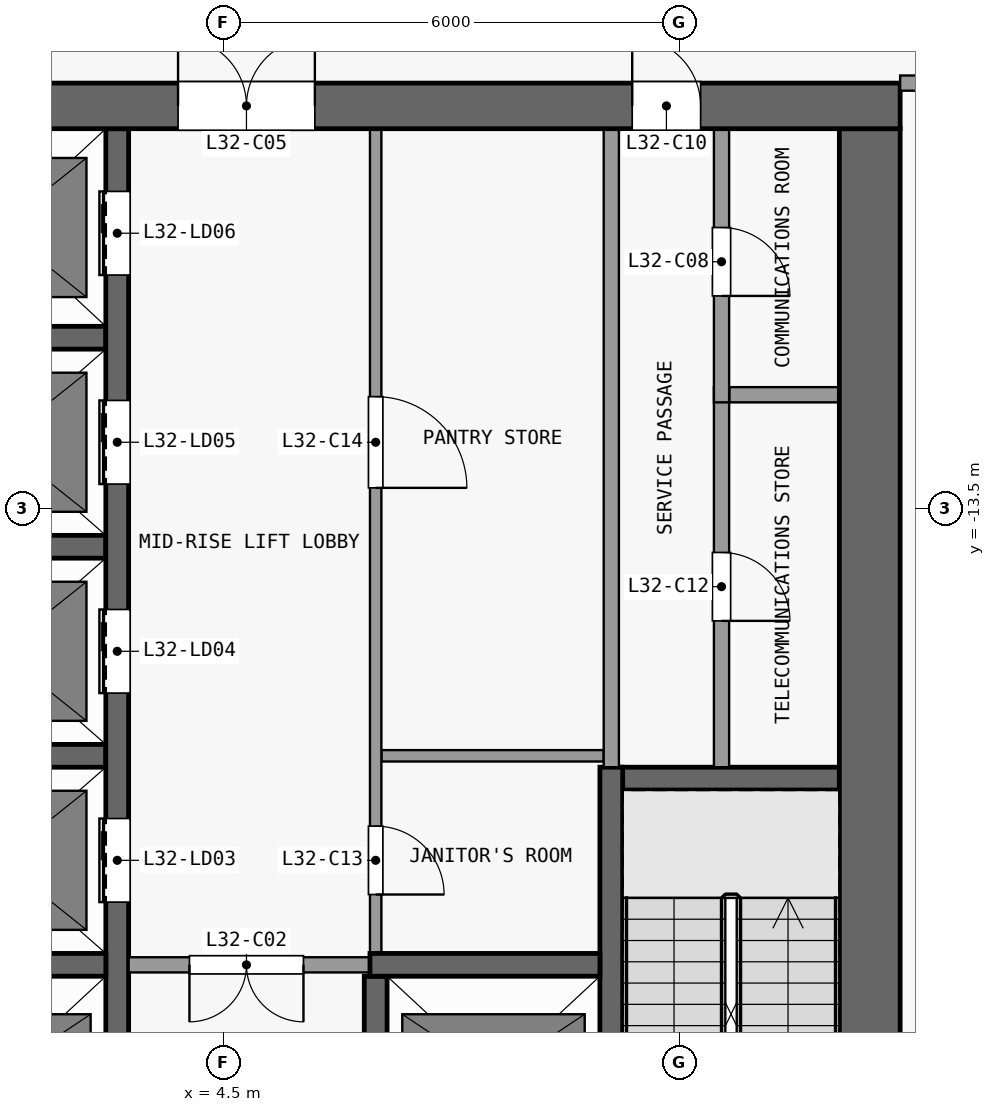
"""IFC4 building model, lengths in metres.
Left out: names, types, materials, properties, quantities, classifications, styles, units other than length and angle.
Written with IfcOpenShell. Run it as: python <this file> out.ifc"""

import sys

from ifc_helpers import new_model, si_unit, direction, frame, frame_2d, origin, place, context, subcontext, project, spatial, rectangle, extrude, element, fill, save


model = new_model("IFC4")
c1 = context("Model", 3, precision=1e-05, world=origin(), true_north=direction((0.0, 1.0)))
c2 = subcontext(c1, "Body", "Model", "MODEL_VIEW")
j1 = project(units=[si_unit("LENGTHUNIT", "METRE"), si_unit("PLANEANGLEUNIT", "RADIAN")], contexts=[c1])
p1 = place(None, origin())
s1 = spatial("IfcSite", under=j1, at=p1, CompositionType="ELEMENT")
p2 = place(p1, origin())
s2 = spatial("IfcBuilding", under=s1, at=p2, CompositionType="ELEMENT")
p3 = place(p2, frame((0.0, 0.0, 127.9)))
s3 = spatial("IfcBuildingStorey", under=s2, at=p3, CompositionType="ELEMENT", Elevation=127.9)
p4 = place(p3, frame((-13.4, -8.2, 0.0), z_axis=(0.0, 0.0, 1.0), x_axis=(1.0, 0.0, 0.0)))
e1 = element("IfcWall", 1, at=p4, inside=s3, PredefinedType="SHEAR", context=c2, shape_type="SweptSolid", body=[
    extrude(rectangle(XDim=26.8, YDim=0.6, at=frame_2d((13.4, 0.0))), origin(), (0.0, 0.0, 1.0), 5.7),
])
p5 = place(p4, frame((7.7, 0.0, 0.0)))
e2 = element("IfcOpeningElement", 2, at=p5, cuts=e1, PredefinedType="OPENING", context=c2, shape_type="SweptSolid", body=[
    extrude(rectangle(XDim=1.8, YDim=2.1, at=frame_2d((0.9, 1.05))), frame((0.0, 0.31, 0.0), z_axis=(0.0, -1.0, 0.0), x_axis=(1.0, 0.0, 0.0)), (0.0, 0.0, 1.0), 0.62),
])
p6 = place(p4, frame((17.3, 0.0, 0.0)))
e3 = element("IfcOpeningElement", 3, at=p6, cuts=e1, PredefinedType="OPENING", context=c2, shape_type="SweptSolid", body=[
    extrude(rectangle(XDim=1.8, YDim=2.1, at=frame_2d((0.9, 1.05))), frame((0.0, 0.31, 0.0), z_axis=(0.0, -1.0, 0.0), x_axis=(1.0, 0.0, 0.0)), (0.0, 0.0, 1.0), 0.62),
])
p7 = place(p4, frame((2.625, 0.0, 0.0)))
e4 = element("IfcOpeningElement", 4, at=p7, cuts=e1, PredefinedType="OPENING", context=c2, shape_type="SweptSolid", body=[
    extrude(rectangle(XDim=0.9, YDim=2.1, at=frame_2d((0.45, 1.05))), frame((0.0, 0.31, 0.0), z_axis=(0.0, -1.0, 0.0), x_axis=(1.0, 0.0, 0.0)), (0.0, 0.0, 1.0), 0.62),
])
p8 = place(p4, frame((23.275, 0.0, 0.0)))
e5 = element("IfcOpeningElement", 5, at=p8, cuts=e1, PredefinedType="OPENING", context=c2, shape_type="SweptSolid", body=[
    extrude(rectangle(XDim=0.9, YDim=2.1, at=frame_2d((0.45, 1.05))), frame((0.0, 0.31, 0.0), z_axis=(0.0, -1.0, 0.0), x_axis=(1.0, 0.0, 0.0)), (0.0, 0.0, 1.0), 0.62),
])
p9 = place(p3, frame((13.0, -24.6, 0.0), z_axis=(0.0, 0.0, 1.0), x_axis=(0.0, 1.0, 0.0)))
e6 = element("IfcWall", 6, at=p9, inside=s3, PredefinedType="SHEAR", context=c2, shape_type="SweptSolid", body=[
    extrude(rectangle(XDim=16.1, YDim=0.8, at=frame_2d((8.05, 0.0))), origin(), (0.0, 0.0, 1.0), 5.7),
])
p10 = place(p3, frame((0.15, -19.5, 0.0), z_axis=(0.0, 0.0, 1.0), x_axis=(1.0, 0.0, 0.0)))
e7 = element("IfcWall", 7, at=p10, inside=s3, PredefinedType="SHEAR", context=c2, shape_type="SweptSolid", body=[
    extrude(rectangle(XDim=2.8, YDim=0.3, at=frame_2d((1.4, 0.0))), origin(), (0.0, 0.0, 1.0), 5.7),
])
p11 = place(p3, frame((6.575, -19.5, 0.0), z_axis=(0.0, 0.0, 1.0), x_axis=(-1.0, 0.0, 0.0)))
e8 = element("IfcWall", 8, at=p11, inside=s3, PredefinedType="PARTITIONING", context=c2, shape_type="SweptSolid", body=[
    extrude(rectangle(XDim=3.325, YDim=0.2, at=frame_2d((1.663, 0.0))), origin(), (0.0, 0.0, 1.0), 5.7),
])
p12 = place(p11, frame((1.025, 0.0, 0.0)))
e9 = element("IfcOpeningElement", 9, at=p12, cuts=e8, PredefinedType="OPENING", context=c2, shape_type="SweptSolid", body=[
    extrude(rectangle(XDim=1.5, YDim=2.1, at=frame_2d((0.75, 1.05))), frame((0.0, 0.11, 0.0), z_axis=(0.0, -1.0, 0.0), x_axis=(1.0, 0.0, 0.0)), (0.0, 0.0, 1.0), 0.22),
])
p13 = place(p3, frame((6.425, -19.5, 0.0), z_axis=(0.0, 0.0, 1.0), x_axis=(1.0, 0.0, 0.0)))
e10 = element("IfcWall", 10, at=p13, inside=s3, PredefinedType="SHEAR", context=c2, shape_type="SweptSolid", body=[
    extrude(rectangle(XDim=3.025, YDim=0.3, at=frame_2d((1.512, 0.0))), origin(), (0.0, 0.0, 1.0), 5.7),
])
p14 = place(p3, frame((9.5, -17.05, 0.0), z_axis=(0.0, 0.0, 1.0), x_axis=(1.0, 0.0, 0.0)))
e11 = element("IfcWall", 11, at=p14, inside=s3, PredefinedType="SHEAR", context=c2, shape_type="SweptSolid", body=[
    extrude(rectangle(XDim=3.1, YDim=0.3, at=frame_2d((1.55, 0.0))), origin(), (0.0, 0.0, 1.0), 5.7),
])
p15 = place(p3, frame((0.15, -16.75, 0.0), z_axis=(0.0, 0.0, 1.0), x_axis=(1.0, 0.0, 0.0)))
e12 = element("IfcWall", 12, at=p15, inside=s3, PredefinedType="SHEAR", context=c2, shape_type="SweptSolid", body=[
    extrude(rectangle(XDim=2.8, YDim=0.3, at=frame_2d((1.4, 0.0))), origin(), (0.0, 0.0, 1.0), 5.7),
])
p16 = place(p3, frame((6.575, -16.75, 0.0), z_axis=(0.0, 0.0, 1.0), x_axis=(1.0, 0.0, 0.0)))
e13 = element("IfcWall", 13, at=p16, inside=s3, PredefinedType="PARTITIONING", context=c2, shape_type="SweptSolid", body=[
    extrude(rectangle(XDim=2.925, YDim=0.15, at=frame_2d((1.462, 0.0))), origin(), (0.0, 0.0, 1.0), 5.7),
])
p17 = place(p3, frame((0.15, -14.0, 0.0), z_axis=(0.0, 0.0, 1.0), x_axis=(1.0, 0.0, 0.0)))
e14 = element("IfcWall", 14, at=p17, inside=s3, PredefinedType="SHEAR", context=c2, shape_type="SweptSolid", body=[
    extrude(rectangle(XDim=2.8, YDim=0.3, at=frame_2d((1.4, 0.0))), origin(), (0.0, 0.0, 1.0), 5.7),
])
p18 = place(p3, frame((11.15, -12.0, 0.0), z_axis=(0.0, 0.0, 1.0), x_axis=(1.0, 0.0, 0.0)))
e15 = element("IfcWall", 15, at=p18, inside=s3, PredefinedType="PARTITIONING", context=c2, shape_type="SweptSolid", body=[
    extrude(rectangle(XDim=1.45, YDim=0.2, at=frame_2d((0.725, 0.0))), origin(), (0.0, 0.0, 1.0), 5.7),
])
p19 = place(p3, frame((0.15, -11.25, 0.0), z_axis=(0.0, 0.0, 1.0), x_axis=(1.0, 0.0, 0.0)))
e16 = element("IfcWall", 16, at=p19, inside=s3, PredefinedType="SHEAR", context=c2, shape_type="SweptSolid", body=[
    extrude(rectangle(XDim=2.8, YDim=0.3, at=frame_2d((1.4, 0.0))), origin(), (0.0, 0.0, 1.0), 5.7),
])
p20 = place(p3, frame((3.1, -22.55, 0.0), z_axis=(0.0, 0.0, 1.0), x_axis=(0.0, 1.0, 0.0)))
e17 = element("IfcWall", 17, at=p20, inside=s3, PredefinedType="SHEAR", context=c2, shape_type="SweptSolid", body=[
    extrude(rectangle(XDim=14.05, YDim=0.3, at=frame_2d((7.025, 0.0))), origin(), (0.0, 0.0, 1.0), 5.7),
])
p21 = place(p20, frame((1.05, 0.0, 0.0)))
e18 = element("IfcOpeningElement", 18, at=p21, cuts=e17, PredefinedType="OPENING", context=c2, shape_type="SweptSolid", body=[
    extrude(rectangle(XDim=1.1, YDim=2.1, at=frame_2d((0.55, 1.05))), frame((0.0, 0.16, 0.0), z_axis=(0.0, -1.0, 0.0), x_axis=(1.0, 0.0, 0.0)), (0.0, 0.0, 1.0), 0.32),
])
p22 = place(p20, frame((3.875, 0.0, 0.0)))
e19 = element("IfcOpeningElement", 19, at=p22, cuts=e17, PredefinedType="OPENING", context=c2, shape_type="SweptSolid", body=[
    extrude(rectangle(XDim=1.1, YDim=2.1, at=frame_2d((0.55, 1.05))), frame((0.0, 0.16, 0.0), z_axis=(0.0, -1.0, 0.0), x_axis=(1.0, 0.0, 0.0)), (0.0, 0.0, 1.0), 0.32),
])
p23 = place(p20, frame((6.625, 0.0, 0.0)))
e20 = element("IfcOpeningElement", 20, at=p23, cuts=e17, PredefinedType="OPENING", context=c2, shape_type="SweptSolid", body=[
    extrude(rectangle(XDim=1.1, YDim=2.1, at=frame_2d((0.55, 1.05))), frame((0.0, 0.16, 0.0), z_axis=(0.0, -1.0, 0.0), x_axis=(1.0, 0.0, 0.0)), (0.0, 0.0, 1.0), 0.32),
])
p24 = place(p20, frame((9.375, 0.0, 0.0)))
e21 = element("IfcOpeningElement", 21, at=p24, cuts=e17, PredefinedType="OPENING", context=c2, shape_type="SweptSolid", body=[
    extrude(rectangle(XDim=1.1, YDim=2.1, at=frame_2d((0.55, 1.05))), frame((0.0, 0.16, 0.0), z_axis=(0.0, -1.0, 0.0), x_axis=(1.0, 0.0, 0.0)), (0.0, 0.0, 1.0), 0.32),
])
p25 = place(p20, frame((12.125, 0.0, 0.0)))
e22 = element("IfcOpeningElement", 22, at=p25, cuts=e17, PredefinedType="OPENING", context=c2, shape_type="SweptSolid", body=[
    extrude(rectangle(XDim=1.1, YDim=2.1, at=frame_2d((0.55, 1.05))), frame((0.0, 0.16, 0.0), z_axis=(0.0, -1.0, 0.0), x_axis=(1.0, 0.0, 0.0)), (0.0, 0.0, 1.0), 0.32),
])
p26 = place(p3, frame((6.5, -22.25, 0.0), z_axis=(0.0, 0.0, 1.0), x_axis=(0.0, 1.0, 0.0)))
e23 = element("IfcWall", 23, at=p26, inside=s3, PredefinedType="SHEAR", context=c2, shape_type="SweptSolid", body=[
    extrude(rectangle(XDim=2.6, YDim=0.3, at=frame_2d((1.3, 0.0))), origin(), (0.0, 0.0, 1.0), 5.7),
])
p27 = place(p26, frame((0.75, 0.0, 0.0)))
e24 = element("IfcOpeningElement", 24, at=p27, cuts=e23, PredefinedType="OPENING", context=c2, shape_type="SweptSolid", body=[
    extrude(rectangle(XDim=1.1, YDim=2.1, at=frame_2d((0.55, 1.05))), frame((0.0, 0.16, 0.0), z_axis=(0.0, -1.0, 0.0), x_axis=(1.0, 0.0, 0.0)), (0.0, 0.0, 1.0), 0.32),
])
p28 = place(p3, frame((6.5, -8.5, 0.0), z_axis=(0.0, 0.0, 1.0), x_axis=(0.0, -1.0, 0.0)))
e25 = element("IfcWall", 25, at=p28, inside=s3, PredefinedType="PARTITIONING", context=c2, shape_type="SweptSolid", body=[
    extrude(rectangle(XDim=10.85, YDim=0.15, at=frame_2d((5.425, 0.0))), origin(), (0.0, 0.0, 1.0), 5.7),
])
p29 = place(p28, frame((9.175, 0.0, 0.0)))
e26 = element("IfcOpeningElement", 26, at=p29, cuts=e25, PredefinedType="OPENING", context=c2, shape_type="SweptSolid", body=[
    extrude(rectangle(XDim=0.9, YDim=2.1, at=frame_2d((0.45, 1.05))), frame((0.0, 0.085, 0.0), z_axis=(0.0, -1.0, 0.0), x_axis=(1.0, 0.0, 0.0)), (0.0, 0.0, 1.0), 0.17),
])
p30 = place(p28, frame((3.525, 0.0, 0.0)))
e27 = element("IfcOpeningElement", 27, at=p30, cuts=e25, PredefinedType="OPENING", context=c2, shape_type="SweptSolid", body=[
    extrude(rectangle(XDim=1.2, YDim=2.1, at=frame_2d((0.6, 1.05))), frame((0.0, 0.085, 0.0), z_axis=(0.0, -1.0, 0.0), x_axis=(1.0, 0.0, 0.0)), (0.0, 0.0, 1.0), 0.17),
])
p31 = place(p3, frame((9.6, -16.9, 0.0), z_axis=(0.0, 0.0, 1.0), x_axis=(0.0, -1.0, 0.0)))
e28 = element("IfcWall", 28, at=p31, inside=s3, PredefinedType="SHEAR", context=c2, shape_type="SweptSolid", body=[
    extrude(rectangle(XDim=7.7, YDim=0.3, at=frame_2d((3.85, 0.0))), origin(), (0.0, 0.0, 1.0), 5.7),
])
p32 = place(p31, frame((6.5, 0.0, 0.0)))
e29 = element("IfcOpeningElement", 29, at=p32, cuts=e28, PredefinedType="OPENING", context=c2, shape_type="SweptSolid", body=[
    extrude(rectangle(XDim=1.1, YDim=2.1, at=frame_2d((0.55, 1.05))), frame((0.0, 0.16, 0.0), z_axis=(0.0, -1.0, 0.0), x_axis=(1.0, 0.0, 0.0)), (0.0, 0.0, 1.0), 0.32),
])
p33 = place(p3, frame((9.6, -16.9, 0.0), z_axis=(0.0, 0.0, 1.0), x_axis=(0.0, 1.0, 0.0)))
e30 = element("IfcWall", 30, at=p33, inside=s3, PredefinedType="PARTITIONING", context=c2, shape_type="SweptSolid", body=[
    extrude(rectangle(XDim=8.4, YDim=0.2, at=frame_2d((4.2, 0.0))), origin(), (0.0, 0.0, 1.0), 5.7),
])
p34 = place(p3, frame((11.05, -11.9, 0.0), z_axis=(0.0, 0.0, 1.0), x_axis=(0.0, -1.0, 0.0)))
e31 = element("IfcWall", 31, at=p34, inside=s3, PredefinedType="PARTITIONING", context=c2, shape_type="SweptSolid", body=[
    extrude(rectangle(XDim=5.0, YDim=0.2, at=frame_2d((2.5, 0.0))), origin(), (0.0, 0.0, 1.0), 5.7),
])
p35 = place(p34, frame((2.175, 0.0, 0.0)))
e32 = element("IfcOpeningElement", 32, at=p35, cuts=e31, PredefinedType="OPENING", context=c2, shape_type="SweptSolid", body=[
    extrude(rectangle(XDim=0.9, YDim=2.1, at=frame_2d((0.45, 1.05))), frame((0.0, 0.11, 0.0), z_axis=(0.0, -1.0, 0.0), x_axis=(1.0, 0.0, 0.0)), (0.0, 0.0, 1.0), 0.22),
])
p36 = place(p3, frame((11.05, -8.5, 0.0), z_axis=(0.0, 0.0, 1.0), x_axis=(0.0, -1.0, 0.0)))
e33 = element("IfcWall", 33, at=p36, inside=s3, PredefinedType="PARTITIONING", context=c2, shape_type="SweptSolid", body=[
    extrude(rectangle(XDim=3.6, YDim=0.2, at=frame_2d((1.8, 0.0))), origin(), (0.0, 0.0, 1.0), 5.7),
])
p37 = place(p36, frame((1.3, 0.0, 0.0)))
e34 = element("IfcOpeningElement", 34, at=p37, cuts=e33, PredefinedType="OPENING", context=c2, shape_type="SweptSolid", body=[
    extrude(rectangle(XDim=0.9, YDim=2.1, at=frame_2d((0.45, 1.05))), frame((0.0, 0.11, 0.0), z_axis=(0.0, -1.0, 0.0), x_axis=(1.0, 0.0, 0.0)), (0.0, 0.0, 1.0), 0.22),
])
p38 = place(p3, frame((13.4, -7.9, 0.0), z_axis=(0.0, 0.0, 1.0), x_axis=(1.0, 0.0, 0.0)))
e35 = element("IfcWall", 35, at=p38, inside=s3, PredefinedType="PARTITIONING", context=c2, shape_type="SweptSolid", body=[
    extrude(rectangle(XDim=11.838, YDim=0.2, at=frame_2d((5.919, 0.0))), origin(), (0.0, 0.0, 1.0), 5.7),
])
p39 = place(p38, frame((1.9, 0.0, 0.0)))
e36 = element("IfcOpeningElement", 36, at=p39, cuts=e35, PredefinedType="OPENING", context=c2, shape_type="SweptSolid", body=[
    extrude(rectangle(XDim=1.0, YDim=2.1, at=frame_2d((0.5, 1.05))), frame((0.0, 0.11, 0.0), z_axis=(0.0, -1.0, 0.0), x_axis=(1.0, 0.0, 0.0)), (0.0, 0.0, 1.0), 0.22),
])
p40 = place(p38, frame((9.1, 0.0, 0.0)))
e37 = element("IfcOpeningElement", 37, at=p40, cuts=e35, PredefinedType="OPENING", context=c2, shape_type="SweptSolid", body=[
    extrude(rectangle(XDim=1.0, YDim=2.1, at=frame_2d((0.5, 1.05))), frame((0.0, 0.11, 0.0), z_axis=(0.0, -1.0, 0.0), x_axis=(1.0, 0.0, 0.0)), (0.0, 0.0, 1.0), 0.22),
])
p41 = place(p22, origin())
e38 = element("IfcDoor", 38, at=p41, inside=s3, OperationType="DOUBLE_DOOR_SLIDING", PredefinedType="DOOR", context=c2, shape_type="SweptSolid", body=[
    extrude(rectangle(XDim=1.1, YDim=2.1, at=frame_2d((0.55, 1.05))), frame((0.0, 0.025, 0.0), z_axis=(0.0, -1.0, 0.0), x_axis=(1.0, 0.0, 0.0)), (0.0, 0.0, 1.0), 0.05),
])
fill(e19, e38)
p42 = place(p23, origin())
e39 = element("IfcDoor", 39, at=p42, inside=s3, OperationType="DOUBLE_DOOR_SLIDING", PredefinedType="DOOR", context=c2, shape_type="SweptSolid", body=[
    extrude(rectangle(XDim=1.1, YDim=2.1, at=frame_2d((0.55, 1.05))), frame((0.0, 0.025, 0.0), z_axis=(0.0, -1.0, 0.0), x_axis=(1.0, 0.0, 0.0)), (0.0, 0.0, 1.0), 0.05),
])
fill(e20, e39)
p43 = place(p24, origin())
e40 = element("IfcDoor", 40, at=p43, inside=s3, OperationType="DOUBLE_DOOR_SLIDING", PredefinedType="DOOR", context=c2, shape_type="SweptSolid", body=[
    extrude(rectangle(XDim=1.1, YDim=2.1, at=frame_2d((0.55, 1.05))), frame((0.0, 0.025, 0.0), z_axis=(0.0, -1.0, 0.0), x_axis=(1.0, 0.0, 0.0)), (0.0, 0.0, 1.0), 0.05),
])
fill(e21, e40)
p44 = place(p25, origin())
e41 = element("IfcDoor", 41, at=p44, inside=s3, OperationType="DOUBLE_DOOR_SLIDING", PredefinedType="DOOR", context=c2, shape_type="SweptSolid", body=[
    extrude(rectangle(XDim=1.1, YDim=2.1, at=frame_2d((0.55, 1.05))), frame((0.0, 0.025, 0.0), z_axis=(0.0, -1.0, 0.0), x_axis=(1.0, 0.0, 0.0)), (0.0, 0.0, 1.0), 0.05),
])
fill(e22, e41)
p45 = place(p12, origin())
e42 = element("IfcDoor", 42, at=p45, inside=s3, OperationType="DOUBLE_DOOR_SINGLE_SWING", PredefinedType="DOOR", context=c2, shape_type="SweptSolid", body=[
    extrude(rectangle(XDim=1.5, YDim=2.1, at=frame_2d((0.75, 1.05))), frame((0.0, 0.025, 0.0), z_axis=(0.0, -1.0, 0.0), x_axis=(1.0, 0.0, 0.0)), (0.0, 0.0, 1.0), 0.05),
])
fill(e9, e42)
p46 = place(p6, origin())
e43 = element("IfcDoor", 43, at=p46, inside=s3, OperationType="DOUBLE_DOOR_SINGLE_SWING", PredefinedType="DOOR", context=c2, shape_type="SweptSolid", body=[
    extrude(rectangle(XDim=1.8, YDim=2.1, at=frame_2d((0.9, 1.05))), frame((0.0, 0.025, 0.0), z_axis=(0.0, -1.0, 0.0), x_axis=(1.0, 0.0, 0.0)), (0.0, 0.0, 1.0), 0.05),
])
fill(e3, e43)
p47 = place(p37, origin())
e44 = element("IfcDoor", 44, at=p47, inside=s3, OperationType="SINGLE_SWING_RIGHT", PredefinedType="DOOR", context=c2, shape_type="SweptSolid", body=[
    extrude(rectangle(XDim=0.9, YDim=2.1, at=frame_2d((0.45, 1.05))), frame((0.0, 0.025, 0.0), z_axis=(0.0, -1.0, 0.0), x_axis=(1.0, 0.0, 0.0)), (0.0, 0.0, 1.0), 0.05),
])
fill(e34, e44)
p48 = place(p8, origin())
e45 = element("IfcDoor", 45, at=p48, inside=s3, OperationType="SINGLE_SWING_LEFT", PredefinedType="DOOR", context=c2, shape_type="SweptSolid", body=[
    extrude(rectangle(XDim=0.9, YDim=2.1, at=frame_2d((0.45, 1.05))), frame((0.0, 0.025, 0.0), z_axis=(0.0, -1.0, 0.0), x_axis=(1.0, 0.0, 0.0)), (0.0, 0.0, 1.0), 0.05),
])
fill(e5, e45)
p49 = place(p35, origin())
e46 = element("IfcDoor", 46, at=p49, inside=s3, OperationType="SINGLE_SWING_RIGHT", PredefinedType="DOOR", context=c2, shape_type="SweptSolid", body=[
    extrude(rectangle(XDim=0.9, YDim=2.1, at=frame_2d((0.45, 1.05))), frame((0.0, 0.025, 0.0), z_axis=(0.0, -1.0, 0.0), x_axis=(1.0, 0.0, 0.0)), (0.0, 0.0, 1.0), 0.05),
])
fill(e32, e46)
p50 = place(p29, origin())
e47 = element("IfcDoor", 47, at=p50, inside=s3, OperationType="SINGLE_SWING_RIGHT", PredefinedType="DOOR", context=c2, shape_type="SweptSolid", body=[
    extrude(rectangle(XDim=0.9, YDim=2.1, at=frame_2d((0.45, 1.05))), frame((0.0, 0.025, 0.0), z_axis=(0.0, -1.0, 0.0), x_axis=(1.0, 0.0, 0.0)), (0.0, 0.0, 1.0), 0.05),
])
fill(e26, e47)
p51 = place(p30, origin())
e48 = element("IfcDoor", 48, at=p51, inside=s3, OperationType="SINGLE_SWING_RIGHT", PredefinedType="DOOR", context=c2, shape_type="SweptSolid", body=[
    extrude(rectangle(XDim=1.2, YDim=2.1, at=frame_2d((0.6, 1.05))), frame((0.0, 0.025, 0.0), z_axis=(0.0, -1.0, 0.0), x_axis=(1.0, 0.0, 0.0)), (0.0, 0.0, 1.0), 0.05),
])
fill(e27, e48)
save(model, sys.argv[1])
